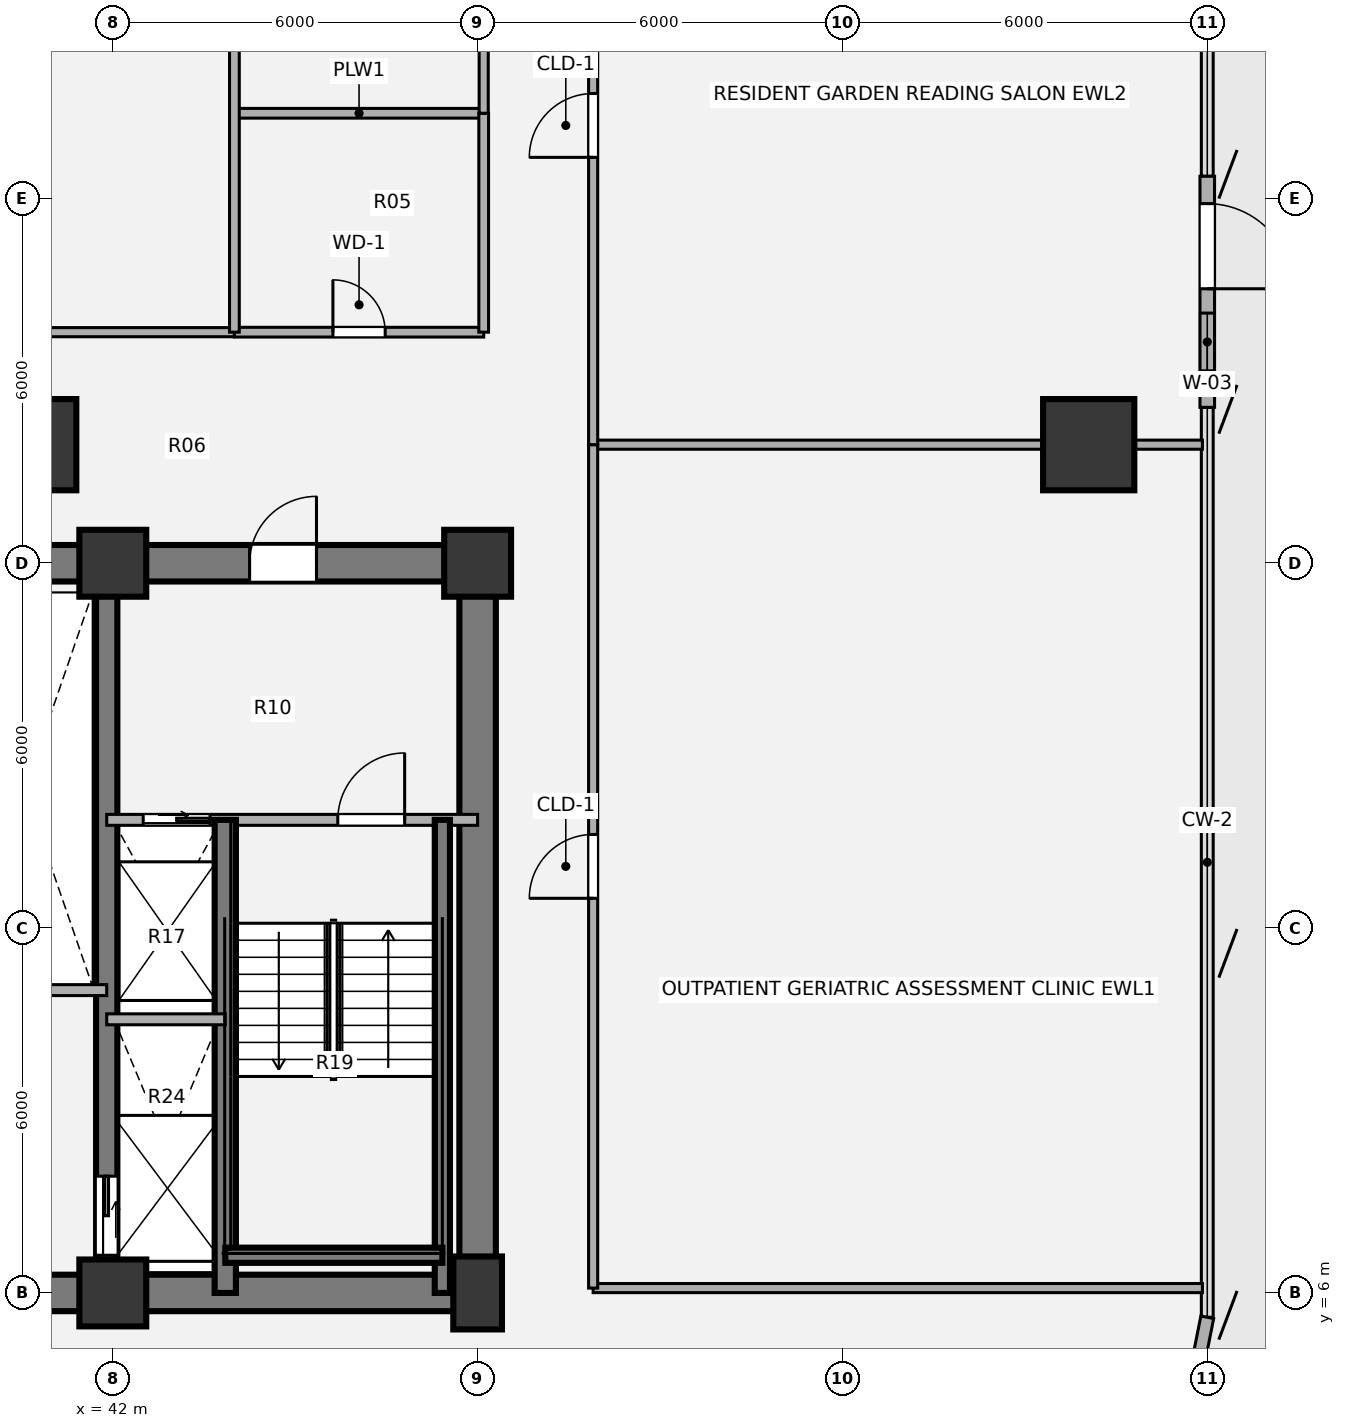
"""IFC4 building model, lengths in metres.
Left out: names, types, materials, properties, quantities, classifications, styles, units other than length and angle.
Written with IfcOpenShell. Run it as: python <this file> out.ifc"""

import sys

from ifc_helpers import new_model, si_unit, direction, frame, frame_2d, origin, origin_2d, place, context, subcontext, project, spatial, rectangle, hollow_circle, extrude, source, transform, mapped, element, fill, save


model = new_model("IFC4")
c1 = context("Model", 3, precision=1e-05, world=origin(), true_north=direction((0.0, 1.0)))
c2 = subcontext(c1, "Body", "Model", "MODEL_VIEW")
j1 = project(units=[si_unit("LENGTHUNIT", "METRE"), si_unit("PLANEANGLEUNIT", "RADIAN")], contexts=[c1])
p1 = place(None, origin())
s1 = spatial("IfcSite", under=j1, at=p1, CompositionType="ELEMENT")
p2 = place(p1, origin())
s2 = spatial("IfcBuilding", under=s1, at=p2, CompositionType="ELEMENT")
p3 = place(p2, frame((0.0, 0.0, 27.0)))
s3 = spatial("IfcBuildingStorey", under=s2, at=p3, CompositionType="ELEMENT", Elevation=27.0)
m1 = source(origin(), c2, "Body", "SweptSolid", [
    extrude(rectangle(XDim=1.1, YDim=1.1, at=origin_2d()), origin(), (0.0, 0.0, 1.0), 3.78),
])
p4 = place(p3, frame((42.0, 6.0, 0.0), z_axis=(0.0, 0.0, 1.0), x_axis=(1.0, 0.0, 0.0)))
e1 = element("IfcColumn", 1, at=p4, inside=s3, PredefinedType="COLUMN", context=c2, shape_type="MappedRepresentation", body=[
    mapped(m1, transform((0.0, 0.0, 0.0), x_axis=(1.0, 0.0, 0.0), y_axis=(0.0, 1.0, 0.0), z_axis=(0.0, 0.0, 1.0), scale=1.0)),
])
m2 = source(origin(), c2, "Body", "SweptSolid", [
    extrude(rectangle(XDim=0.8, YDim=1.2, at=origin_2d()), origin(), (0.0, 0.0, 1.0), 3.78),
])
p5 = place(p3, frame((48.0, 6.0, 0.0), z_axis=(0.0, 0.0, 1.0), x_axis=(1.0, 0.0, 0.0)))
e2 = element("IfcColumn", 2, at=p5, inside=s3, PredefinedType="COLUMN", context=c2, shape_type="MappedRepresentation", body=[
    mapped(m2, transform((0.0, 0.0, 0.0), x_axis=(1.0, 0.0, 0.0), y_axis=(0.0, 1.0, 0.0), z_axis=(0.0, 0.0, 1.0), scale=1.0)),
])
for number, where, z_axis, x_axis in (
    (3, (42.0, 18.0, 0.0), (0.0, 0.0, 1.0), (1.0, 0.0, 0.0)),
    (4, (48.0, 18.0, 0.0), (0.0, 0.0, 1.0), (1.0, 0.0, 0.0)),
):
    element("IfcColumn", number, at=place(p3, frame(where, z_axis=z_axis, x_axis=x_axis)), inside=s3, PredefinedType="COLUMN", context=c2, shape_type="MappedRepresentation", body=[
        mapped(m1, transform((0.0, 0.0, 0.0), x_axis=(1.0, 0.0, 0.0), y_axis=(0.0, 1.0, 0.0), z_axis=(0.0, 0.0, 1.0), scale=1.0)),
    ])
p6 = place(p3, frame((48.3, 6.0, 0.0), z_axis=(0.0, 0.0, 1.0), x_axis=(-1.0, 0.0, 0.0)))
e5 = element("IfcWall", 5, at=p6, inside=s3, PredefinedType="SHEAR", context=c2, shape_type="SweptSolid", body=[
    extrude(rectangle(XDim=24.6, YDim=0.6, at=frame_2d((12.3, 0.0))), origin(), (0.0, 0.0, 1.0), 3.78),
])
p7 = place(p3, frame((48.0, 18.0, 0.0), z_axis=(0.0, 0.0, 1.0), x_axis=(0.0, -1.0, 0.0)))
e6 = element("IfcWall", 6, at=p7, inside=s3, PredefinedType="SHEAR", context=c2, shape_type="SweptSolid", body=[
    extrude(rectangle(XDim=12.0, YDim=0.6, at=frame_2d((6.0, 0.0))), origin(), (0.0, 0.0, 1.0), 3.78),
])
p8 = place(p3, frame((38.8, 18.0, 0.0), z_axis=(0.0, 0.0, 1.0), x_axis=(1.0, 0.0, 0.0)))
e7 = element("IfcWall", 7, at=p8, inside=s3, PredefinedType="SHEAR", context=c2, shape_type="SweptSolid", body=[
    extrude(rectangle(XDim=9.5, YDim=0.6, at=frame_2d((4.75, 0.0))), origin(), (0.0, 0.0, 1.0), 3.78),
])
p9 = place(p8, frame((5.45, 0.0, 0.0)))
e8 = element("IfcOpeningElement", 8, at=p9, cuts=e7, PredefinedType="OPENING", context=c2, shape_type="SweptSolid", body=[
    extrude(rectangle(XDim=1.1, YDim=2.1, at=origin_2d()), frame((0.55, 0.31, 1.05), z_axis=(0.0, -1.0, 0.0), x_axis=(1.0, 0.0, 0.0)), (0.0, 0.0, 1.0), 0.62),
])
p10 = place(p3, frame((41.9, 18.0, 0.0), z_axis=(0.0, 0.0, 1.0), x_axis=(0.0, -1.0, 0.0)))
e9 = element("IfcWall", 9, at=p10, inside=s3, PredefinedType="SHEAR", context=c2, shape_type="SweptSolid", body=[
    extrude(rectangle(XDim=12.0, YDim=0.35, at=frame_2d((6.0, 0.0))), origin(), (0.0, 0.0, 1.0), 3.78),
])
p11 = place(p10, frame((10.08, 0.0, 0.0)))
e10 = element("IfcOpeningElement", 10, at=p11, cuts=e9, PredefinedType="OPENING", context=c2, shape_type="SweptSolid", body=[
    extrude(rectangle(XDim=1.3, YDim=2.1, at=origin_2d()), frame((0.65, 0.185, 1.05), z_axis=(0.0, -1.0, 0.0), x_axis=(1.0, 0.0, 0.0)), (0.0, 0.0, 1.0), 0.37),
])
m3 = source(origin(), c2, "Body", "SweptSolid", [
    extrude(hollow_circle(Radius=0.75, WallThickness=0.05, at=origin_2d()), origin(), (0.0, 0.0, 1.0), 3.78),
])
for number, where, z_axis, x_axis in (
    (11, (58.05, 19.95, 0.0), (0.0, 0.0, 1.0), (1.0, 0.0, 0.0)),
    (12, (40.65, 19.95, 0.0), (0.0, 0.0, 1.0), (1.0, 0.0, 0.0)),
):
    element("IfcColumn", number, at=place(p3, frame(where, z_axis=z_axis, x_axis=x_axis)), inside=s3, PredefinedType="COLUMN", context=c2, shape_type="MappedRepresentation", body=[
        mapped(m3, transform((0.0, 0.0, 0.0), x_axis=(1.0, 0.0, 0.0), y_axis=(0.0, 1.0, 0.0), z_axis=(0.0, 0.0, 1.0), scale=1.0)),
    ])
p12 = place(p3, frame((60.0, 24.364, 0.0), z_axis=(0.0, 0.0, 1.0), x_axis=(0.0, -1.0, 0.0)))
e13 = element("IfcWall", 13, at=p12, inside=s3, PredefinedType="SOLIDWALL", context=c2, shape_type="SweptSolid", body=[
    extrude(rectangle(XDim=3.8, YDim=0.24, at=frame_2d((1.9, 0.0))), origin(), (0.0, 0.0, 1.0), 3.53),
])
p13 = place(p12, frame((0.45, 0.0, 0.0)))
e14 = element("IfcOpeningElement", 14, at=p13, cuts=e13, PredefinedType="OPENING", context=c2, shape_type="SweptSolid", body=[
    extrude(rectangle(XDim=1.4, YDim=2.15, at=origin_2d()), frame((0.7, 0.13, 1.075), z_axis=(0.0, -1.0, 0.0), x_axis=(1.0, 0.0, 0.0)), (0.0, 0.0, 1.0), 0.26),
])
p14 = place(p12, frame((2.25, 0.0, 0.85)))
e15 = element("IfcOpeningElement", 15, at=p14, cuts=e13, PredefinedType="OPENING", context=c2, shape_type="SweptSolid", body=[
    extrude(rectangle(XDim=0.95, YDim=1.35, at=origin_2d()), frame((0.475, 0.13, 0.675), z_axis=(0.0, -1.0, 0.0), x_axis=(1.0, 0.0, 0.0)), (0.0, 0.0, 1.0), 0.26),
])
p15 = place(p3, frame((60.0, 5.6, 0.0), z_axis=(0.0, 0.0, 1.0), x_axis=(-0.195138390419, -0.980775717779, 0.0)))
e16 = element("IfcWall", 16, at=p15, inside=s3, PredefinedType="SOLIDWALL", context=c2, shape_type="SweptSolid", body=[
    extrude(rectangle(XDim=1.249, YDim=0.215, at=frame_2d((0.624, 0.0))), origin(), (0.0, 0.0, 1.0), 3.53),
])
p16 = place(p3, frame((39.35, 10.98, 0.0), z_axis=(0.0, 0.0, 1.0), x_axis=(1.0, 0.0, 0.0)))
e17 = element("IfcWall", 17, at=p16, inside=s3, PredefinedType="PARTITIONING", context=c2, shape_type="SweptSolid", body=[
    extrude(rectangle(XDim=2.55, YDim=0.18, at=frame_2d((1.275, 0.0))), origin(), (0.0, 0.0, 1.0), 3.5),
])
p17 = place(p3, frame((41.9, 13.78, 0.0), z_axis=(0.0, 0.0, 1.0), x_axis=(1.0, 0.0, 0.0)))
e18 = element("IfcWall", 18, at=p17, inside=s3, PredefinedType="PARTITIONING", context=c2, shape_type="SweptSolid", body=[
    extrude(rectangle(XDim=6.1, YDim=0.18, at=frame_2d((3.05, 0.0))), origin(), (0.0, 0.0, 1.0), 3.5),
])
p18 = place(p17, frame((0.6, 0.0, 0.0)))
e19 = element("IfcOpeningElement", 19, at=p18, cuts=e18, PredefinedType="OPENING", context=c2, shape_type="SweptSolid", body=[
    extrude(rectangle(XDim=1.1, YDim=2.1, at=origin_2d()), frame((0.55, 0.1, 1.05), z_axis=(0.0, -1.0, 0.0), x_axis=(1.0, 0.0, 0.0)), (0.0, 0.0, 1.0), 0.2),
])
p19 = place(p17, frame((3.8, 0.0, 0.0)))
e20 = element("IfcOpeningElement", 20, at=p19, cuts=e18, PredefinedType="OPENING", context=c2, shape_type="SweptSolid", body=[
    extrude(rectangle(XDim=1.1, YDim=2.1, at=origin_2d()), frame((0.55, 0.1, 1.05), z_axis=(0.0, -1.0, 0.0), x_axis=(1.0, 0.0, 0.0)), (0.0, 0.0, 1.0), 0.2),
])
p20 = place(p3, frame((43.85, 6.0, 0.0), z_axis=(0.0, 0.0, 1.0), x_axis=(0.0, 1.0, 0.0)))
e21 = element("IfcWall", 21, at=p20, inside=s3, PredefinedType="SHEAR", context=c2, shape_type="SweptSolid", body=[
    extrude(rectangle(XDim=7.78, YDim=0.35, at=frame_2d((3.89, 0.0))), origin(), (0.0, 0.0, 1.0), 3.85),
])
p21 = place(p3, frame((47.42, 6.0, 0.0), z_axis=(0.0, 0.0, 1.0), x_axis=(0.0, 1.0, 0.0)))
e22 = element("IfcWall", 22, at=p21, inside=s3, PredefinedType="SHEAR", context=c2, shape_type="SweptSolid", body=[
    extrude(rectangle(XDim=7.78, YDim=0.25, at=frame_2d((3.89, 0.0))), origin(), (0.0, 0.0, 1.0), 3.85),
])
p22 = place(p3, frame((43.85, 6.62, 0.0), z_axis=(0.0, 0.0, 1.0), x_axis=(1.0, 0.0, 0.0)))
e23 = element("IfcWall", 23, at=p22, inside=s3, PredefinedType="SHEAR", context=c2, shape_type="SweptSolid", body=[
    extrude(rectangle(XDim=3.57, YDim=0.25, at=frame_2d((1.785, 0.0))), origin(), (0.0, 0.0, 1.0), 3.85),
])
p23 = place(p3, frame((41.9, 10.5, 0.0), z_axis=(0.0, 0.0, 1.0), x_axis=(1.0, 0.0, 0.0)))
e24 = element("IfcWall", 24, at=p23, inside=s3, PredefinedType="PARTITIONING", context=c2, shape_type="SweptSolid", body=[
    extrude(rectangle(XDim=1.95, YDim=0.18, at=frame_2d((0.975, 0.0))), origin(), (0.0, 0.0, 1.0), 3.5),
])
p24 = place(p3, frame((49.9, 6.08, 0.0), z_axis=(0.0, 0.0, 1.0), x_axis=(1.0, 0.0, 0.0)))
e25 = element("IfcWall", 25, at=p24, inside=s3, PredefinedType="PARTITIONING", context=c2, shape_type="SweptSolid", body=[
    extrude(rectangle(XDim=10.02, YDim=0.15, at=frame_2d((5.01, 0.0))), origin(), (0.0, 0.0, 1.0), 3.5),
])
p25 = place(p3, frame((49.9, 19.95, 0.0), z_axis=(0.0, 0.0, 1.0), x_axis=(1.0, 0.0, 0.0)))
e26 = element("IfcWall", 26, at=p25, inside=s3, PredefinedType="PARTITIONING", context=c2, shape_type="SweptSolid", body=[
    extrude(rectangle(XDim=10.02, YDim=0.15, at=frame_2d((5.01, 0.0))), origin(), (0.0, 0.0, 1.0), 2.715),
])
p26 = place(p3, frame((34.4, 21.8, 0.0), z_axis=(0.0, 0.0, 1.0), x_axis=(1.0, 0.0, 0.0)))
e27 = element("IfcWall", 27, at=p26, inside=s3, PredefinedType="PARTITIONING", context=c2, shape_type="SweptSolid", body=[
    extrude(rectangle(XDim=9.6, YDim=0.15, at=frame_2d((4.8, 0.0))), origin(), (0.0, 0.0, 1.0), 2.982),
])
p27 = place(p26, frame((3.795, 0.0, 0.0)))
e28 = element("IfcOpeningElement", 28, at=p27, cuts=e27, PredefinedType="OPENING", context=c2, shape_type="SweptSolid", body=[
    extrude(rectangle(XDim=1.05, YDim=2.1, at=origin_2d()), frame((0.525, 0.085, 1.05), z_axis=(0.0, -1.0, 0.0), x_axis=(1.0, 0.0, 0.0)), (0.0, 0.0, 1.0), 0.17),
])
p28 = place(p3, frame((44.0, 21.8, 0.0), z_axis=(0.0, 0.0, 1.0), x_axis=(1.0, 0.0, 0.0)))
e29 = element("IfcWall", 29, at=p28, inside=s3, PredefinedType="PLUMBINGWALL", context=c2, shape_type="SweptSolid", body=[
    extrude(rectangle(XDim=4.1, YDim=0.16, at=frame_2d((2.05, 0.0))), origin(), (0.0, 0.0, 1.0), 2.982),
])
p29 = place(p28, frame((1.62, 0.0, 0.0)))
e30 = element("IfcOpeningElement", 30, at=p29, cuts=e29, PredefinedType="OPENING", context=c2, shape_type="SweptSolid", body=[
    extrude(rectangle(XDim=0.86, YDim=2.1, at=origin_2d()), frame((0.43, 0.09, 1.05), z_axis=(0.0, -1.0, 0.0), x_axis=(1.0, 0.0, 0.0)), (0.0, 0.0, 1.0), 0.18),
])
p30 = place(p3, frame((44.0, 25.4, 0.0), z_axis=(0.0, 0.0, 1.0), x_axis=(1.0, 0.0, 0.0)))
e31 = element("IfcWall", 31, at=p30, inside=s3, PredefinedType="PLUMBINGWALL", context=c2, shape_type="SweptSolid", body=[
    extrude(rectangle(XDim=4.1, YDim=0.16, at=frame_2d((2.05, 0.0))), origin(), (0.0, 0.0, 1.0), 3.055),
])
p31 = place(p3, frame((44.0, 21.8, 0.0), z_axis=(0.0, 0.0, 1.0), x_axis=(0.0, 1.0, 0.0)))
e32 = element("IfcWall", 32, at=p31, inside=s3, PredefinedType="PLUMBINGWALL", context=c2, shape_type="SweptSolid", body=[
    extrude(rectangle(XDim=10.4, YDim=0.16, at=frame_2d((5.2, 0.0))), origin(), (0.0, 0.0, 1.0), 3.5),
])
p32 = place(p3, frame((48.1, 21.8, 0.0), z_axis=(0.0, 0.0, 1.0), x_axis=(0.0, 1.0, 0.0)))
e33 = element("IfcWall", 33, at=p32, inside=s3, PredefinedType="PLUMBINGWALL", context=c2, shape_type="SweptSolid", body=[
    extrude(rectangle(XDim=3.6, YDim=0.16, at=frame_2d((1.8, 0.0))), origin(), (0.0, 0.0, 1.0), 3.5),
])
p33 = place(p3, frame((48.1, 25.4, 0.0), z_axis=(0.0, 0.0, 1.0), x_axis=(0.0, 1.0, 0.0)))
e34 = element("IfcWall", 34, at=p33, inside=s3, PredefinedType="PARTITIONING", context=c2, shape_type="SweptSolid", body=[
    extrude(rectangle(XDim=5.8, YDim=0.15, at=frame_2d((2.9, 0.0))), origin(), (0.0, 0.0, 1.0), 3.5),
])
p34 = place(p33, frame((1.86, 0.0, 0.0)))
e35 = element("IfcOpeningElement", 35, at=p34, cuts=e34, PredefinedType="OPENING", context=c2, shape_type="SweptSolid", body=[
    extrude(rectangle(XDim=0.86, YDim=2.1, at=origin_2d()), frame((0.43, 0.085, 1.05), z_axis=(0.0, -1.0, 0.0), x_axis=(1.0, 0.0, 0.0)), (0.0, 0.0, 1.0), 0.17),
])
p35 = place(p3, frame((49.9, 6.08, 0.0), z_axis=(0.0, 0.0, 1.0), x_axis=(0.0, 1.0, 0.0)))
e36 = element("IfcWall", 36, at=p35, inside=s3, PredefinedType="PARTITIONING", context=c2, shape_type="SweptSolid", body=[
    extrude(rectangle(XDim=13.87, YDim=0.15, at=frame_2d((6.935, 0.0))), origin(), (0.0, 0.0, 1.0), 3.5),
])
p36 = place(p35, frame((6.41, 0.0, 0.0)))
e37 = element("IfcOpeningElement", 37, at=p36, cuts=e36, PredefinedType="OPENING", context=c2, shape_type="SweptSolid", body=[
    extrude(rectangle(XDim=1.05, YDim=2.1, at=origin_2d()), frame((0.525, 0.085, 1.05), z_axis=(0.0, -1.0, 0.0), x_axis=(1.0, 0.0, 0.0)), (0.0, 0.0, 1.0), 0.17),
])
p37 = place(p3, frame((49.9, 19.95, 0.0), z_axis=(0.0, 0.0, 1.0), x_axis=(0.0, 1.0, 0.0)))
e38 = element("IfcWall", 38, at=p37, inside=s3, PredefinedType="PARTITIONING", context=c2, shape_type="SweptSolid", body=[
    extrude(rectangle(XDim=10.5, YDim=0.15, at=frame_2d((5.25, 0.0))), origin(), (0.0, 0.0, 1.0), 3.5),
])
p38 = place(p37, frame((4.725, 0.0, 0.0)))
e39 = element("IfcOpeningElement", 39, at=p38, cuts=e38, PredefinedType="OPENING", context=c2, shape_type="SweptSolid", body=[
    extrude(rectangle(XDim=1.05, YDim=2.1, at=origin_2d()), frame((0.525, 0.085, 1.05), z_axis=(0.0, -1.0, 0.0), x_axis=(1.0, 0.0, 0.0)), (0.0, 0.0, 1.0), 0.17),
])
m4 = source(origin(), c2, "Body", "SweptSolid", [
    extrude(rectangle(XDim=1.4, YDim=2.15, at=origin_2d()), frame((0.7, 0.025, 1.075), z_axis=(0.0, -1.0, 0.0), x_axis=(1.0, 0.0, 0.0)), (0.0, 0.0, 1.0), 0.05),
])
p39 = place(p13, origin())
e40 = element("IfcDoor", 40, at=p39, inside=s3, OperationType="SINGLE_SWING_RIGHT", PredefinedType="DOOR", context=c2, shape_type="MappedRepresentation", body=[
    mapped(m4, transform((0.0, 0.0, 0.0), x_axis=(1.0, 0.0, 0.0), y_axis=(0.0, 1.0, 0.0), z_axis=(0.0, 0.0, 1.0), scale=1.0)),
])
fill(e14, e40)
m5 = source(origin(), c2, "Body", "SweptSolid", [
    extrude(rectangle(XDim=0.95, YDim=1.35, at=origin_2d()), frame((0.475, 0.03, 0.675), z_axis=(0.0, -1.0, 0.0), x_axis=(1.0, 0.0, 0.0)), (0.0, 0.0, 1.0), 0.06),
])
p40 = place(p14, origin())
e41 = element("IfcWindow", 41, at=p40, inside=s3, PartitioningType="SINGLE_PANEL", PredefinedType="WINDOW", context=c2, shape_type="MappedRepresentation", body=[
    mapped(m5, transform((0.0, 0.0, 0.0), x_axis=(1.0, 0.0, 0.0), y_axis=(0.0, 1.0, 0.0), z_axis=(0.0, 0.0, 1.0), scale=1.0)),
])
fill(e15, e41)
m6 = source(origin(), c2, "Body", "SweptSolid", [
    extrude(rectangle(XDim=1.1, YDim=2.1, at=origin_2d()), frame((0.55, 0.025, 1.05), z_axis=(0.0, -1.0, 0.0), x_axis=(1.0, 0.0, 0.0)), (0.0, 0.0, 1.0), 0.05),
])
p41 = place(p18, origin())
e42 = element("IfcDoor", 42, at=p41, inside=s3, OperationType="SLIDING_TO_RIGHT", PredefinedType="DOOR", context=c2, shape_type="MappedRepresentation", body=[
    mapped(m6, transform((0.0, 0.0, 0.0), x_axis=(1.0, 0.0, 0.0), y_axis=(0.0, 1.0, 0.0), z_axis=(0.0, 0.0, 1.0), scale=1.0)),
])
fill(e19, e42)
m7 = source(origin(), c2, "Body", "SweptSolid", [
    extrude(rectangle(XDim=1.1, YDim=2.1, at=origin_2d()), frame((0.55, 0.025, 1.05), z_axis=(0.0, -1.0, 0.0), x_axis=(1.0, 0.0, 0.0)), (0.0, 0.0, 1.0), 0.05),
])
p42 = place(p19, origin())
e43 = element("IfcDoor", 43, at=p42, inside=s3, OperationType="SINGLE_SWING_RIGHT", PredefinedType="DOOR", context=c2, shape_type="MappedRepresentation", body=[
    mapped(m7, transform((0.0, 0.0, 0.0), x_axis=(1.0, 0.0, 0.0), y_axis=(0.0, 1.0, 0.0), z_axis=(0.0, 0.0, 1.0), scale=1.0)),
])
fill(e20, e43)
m8 = source(origin(), c2, "Body", "SweptSolid", [
    extrude(rectangle(XDim=1.3, YDim=2.1, at=origin_2d()), frame((0.65, 0.025, 1.05), z_axis=(0.0, -1.0, 0.0), x_axis=(1.0, 0.0, 0.0)), (0.0, 0.0, 1.0), 0.05),
])
p43 = place(p11, origin())
e44 = element("IfcDoor", 44, at=p43, inside=s3, OperationType="SLIDING_TO_LEFT", PredefinedType="DOOR", context=c2, shape_type="MappedRepresentation", body=[
    mapped(m8, transform((0.0, 0.0, 0.0), x_axis=(1.0, 0.0, 0.0), y_axis=(0.0, 1.0, 0.0), z_axis=(0.0, 0.0, 1.0), scale=1.0)),
])
fill(e10, e44)
m9 = source(origin(), c2, "Body", "SweptSolid", [
    extrude(rectangle(XDim=1.1, YDim=2.1, at=origin_2d()), frame((0.55, 0.025, 1.05), z_axis=(0.0, -1.0, 0.0), x_axis=(1.0, 0.0, 0.0)), (0.0, 0.0, 1.0), 0.05),
])
p44 = place(p9, origin())
e45 = element("IfcDoor", 45, at=p44, inside=s3, OperationType="SINGLE_SWING_RIGHT", PredefinedType="DOOR", context=c2, shape_type="MappedRepresentation", body=[
    mapped(m9, transform((0.0, 0.0, 0.0), x_axis=(1.0, 0.0, 0.0), y_axis=(0.0, 1.0, 0.0), z_axis=(0.0, 0.0, 1.0), scale=1.0)),
])
fill(e8, e45)
m10 = source(origin(), c2, "Body", "SweptSolid", [
    extrude(rectangle(XDim=0.86, YDim=2.1, at=origin_2d()), frame((0.43, 0.025, 1.05), z_axis=(0.0, -1.0, 0.0), x_axis=(1.0, 0.0, 0.0)), (0.0, 0.0, 1.0), 0.05),
])
p45 = place(p29, origin())
e46 = element("IfcDoor", 46, at=p45, inside=s3, OperationType="SINGLE_SWING_LEFT", PredefinedType="DOOR", context=c2, shape_type="MappedRepresentation", body=[
    mapped(m10, transform((0.0, 0.0, 0.0), x_axis=(1.0, 0.0, 0.0), y_axis=(0.0, 1.0, 0.0), z_axis=(0.0, 0.0, 1.0), scale=1.0)),
])
fill(e30, e46)
m11 = source(origin(), c2, "Body", "SweptSolid", [
    extrude(rectangle(XDim=1.05, YDim=2.1, at=origin_2d()), frame((0.525, 0.025, 1.05), z_axis=(0.0, -1.0, 0.0), x_axis=(1.0, 0.0, 0.0)), (0.0, 0.0, 1.0), 0.05),
])
p46 = place(p36, origin())
e47 = element("IfcDoor", 47, at=p46, inside=s3, OperationType="SINGLE_SWING_LEFT", PredefinedType="DOOR", context=c2, shape_type="MappedRepresentation", body=[
    mapped(m11, transform((0.0, 0.0, 0.0), x_axis=(1.0, 0.0, 0.0), y_axis=(0.0, 1.0, 0.0), z_axis=(0.0, 0.0, 1.0), scale=1.0)),
])
fill(e37, e47)
p47 = place(p38, origin())
e48 = element("IfcDoor", 48, at=p47, inside=s3, OperationType="SINGLE_SWING_LEFT", PredefinedType="DOOR", context=c2, shape_type="MappedRepresentation", body=[
    mapped(m11, transform((0.0, 0.0, 0.0), x_axis=(1.0, 0.0, 0.0), y_axis=(0.0, 1.0, 0.0), z_axis=(0.0, 0.0, 1.0), scale=1.0)),
])
fill(e39, e48)
save(model, sys.argv[1])
